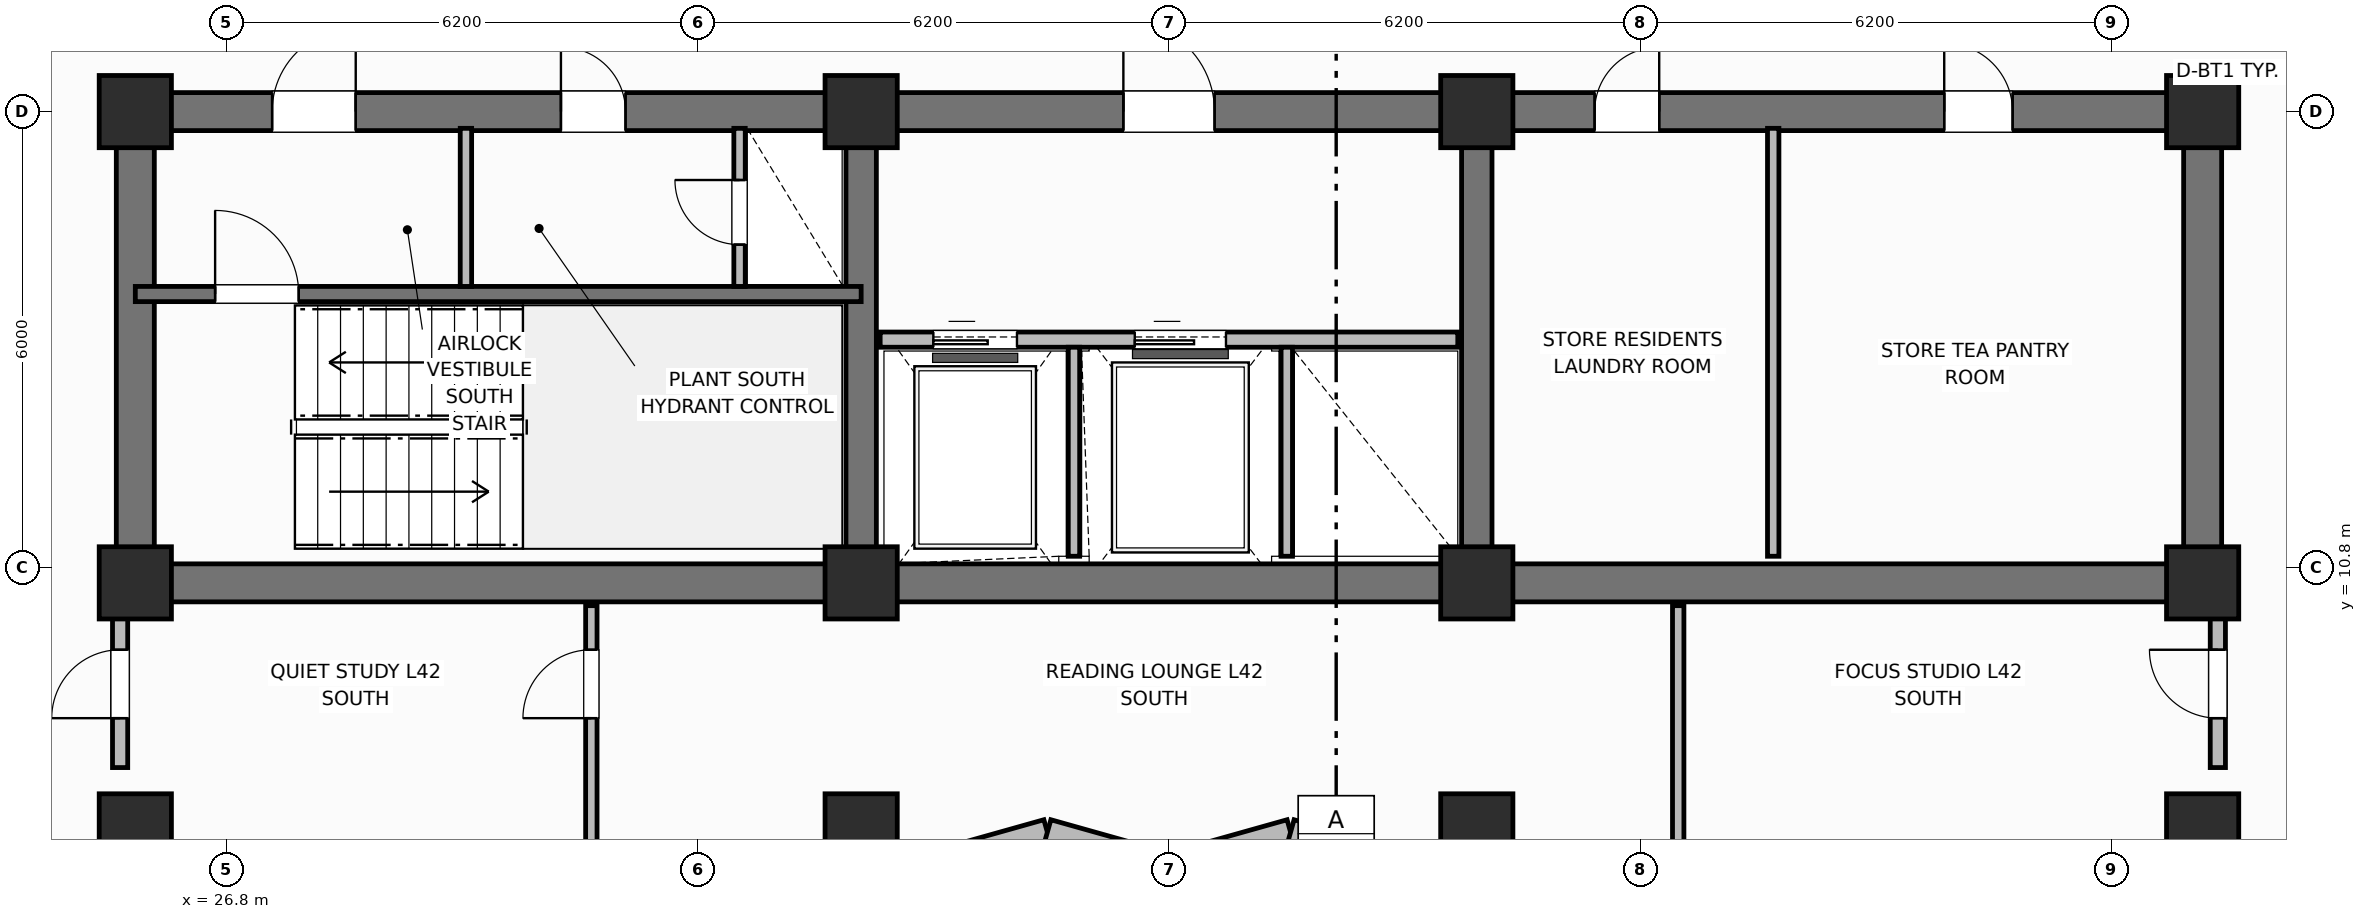
"""IFC4 building model, lengths in metres.
Left out: names, types, materials, properties, quantities, classifications, styles, units other than length and angle.
Written with IfcOpenShell. Run it as: python <this file> out.ifc"""

import sys

from ifc_helpers import new_model, si_unit, direction, frame, frame_2d, origin, origin_2d, place, context, subcontext, project, spatial, rectangle, extrude, element, fill, save


model = new_model("IFC4")
c1 = context("Model", 3, precision=1e-05, world=origin(), true_north=direction((0.0, 1.0)))
c2 = subcontext(c1, "Body", "Model", "MODEL_VIEW")
j1 = project(units=[si_unit("LENGTHUNIT", "METRE"), si_unit("PLANEANGLEUNIT", "RADIAN")], contexts=[c1])
p1 = place(None, origin())
s1 = spatial("IfcSite", under=j1, at=p1, CompositionType="ELEMENT")
p2 = place(p1, origin())
s2 = spatial("IfcBuilding", under=s1, at=p2, CompositionType="ELEMENT")
p3 = place(p2, frame((0.0, 0.0, 170.0)))
s3 = spatial("IfcBuildingStorey", under=s2, at=p3, CompositionType="ELEMENT", Elevation=170.0)
p4 = place(p3, frame((52.8, 10.6, 0.0), z_axis=(0.0, 0.0, 1.0), x_axis=(-1.0, 0.0, 0.0)))
e1 = element("IfcWall", 1, at=p4, inside=s3, PredefinedType="SHEAR", context=c2, shape_type="SweptSolid", body=[
    extrude(rectangle(XDim=27.2, YDim=0.5, at=frame_2d((13.6, 0.0))), origin(), (0.0, 0.0, 1.0), 3.7),
])
for number, where, z_axis, x_axis in (
    (2, (25.6, 10.85, 0.0), (0.0, 0.0, 1.0), (0.0, 1.0, 0.0)),
    (3, (52.8, 10.85, 0.0), (0.0, 0.0, 1.0), (0.0, 1.0, 0.0)),
):
    element("IfcWall", number, at=place(p3, frame(where, z_axis=z_axis, x_axis=x_axis)), inside=s3, PredefinedType="SHEAR", context=c2, shape_type="SweptSolid", body=[
        extrude(rectangle(XDim=5.7, YDim=0.5, at=frame_2d((2.85, 0.0))), origin(), (0.0, 0.0, 1.0), 3.7),
    ])
p5 = place(p3, frame((25.6, 16.8, 0.0), z_axis=(0.0, 0.0, 1.0), x_axis=(1.0, 0.0, 0.0)))
e4 = element("IfcWall", 4, at=p5, inside=s3, PredefinedType="SHEAR", context=c2, shape_type="SweptSolid", body=[
    extrude(rectangle(XDim=27.2, YDim=0.5, at=frame_2d((13.6, 0.0))), origin(), (0.0, 0.0, 1.0), 3.7),
])
p6 = place(p5, frame((1.8, 0.0, 0.0)))
e5 = element("IfcOpeningElement", 5, at=p6, cuts=e4, PredefinedType="OPENING", context=c2, shape_type="SweptSolid", body=[
    extrude(rectangle(XDim=1.1, YDim=2.15, at=frame_2d((0.55, 1.075))), frame((0.0, 0.26, 0.0), z_axis=(0.0, -1.0, 0.0), x_axis=(1.0, 0.0, 0.0)), (0.0, 0.0, 1.0), 0.52),
])
p7 = place(p5, frame((5.6, 0.0, 0.0)))
e6 = element("IfcOpeningElement", 6, at=p7, cuts=e4, PredefinedType="OPENING", context=c2, shape_type="SweptSolid", body=[
    extrude(rectangle(XDim=0.85, YDim=2.1, at=frame_2d((0.425, 1.05))), frame((0.0, 0.26, 0.0), z_axis=(0.0, -1.0, 0.0), x_axis=(1.0, 0.0, 0.0)), (0.0, 0.0, 1.0), 0.52),
])
p8 = place(p5, frame((13.0, 0.0, 0.0)))
e7 = element("IfcOpeningElement", 7, at=p8, cuts=e4, PredefinedType="OPENING", context=c2, shape_type="SweptSolid", body=[
    extrude(rectangle(XDim=1.2, YDim=2.15, at=frame_2d((0.6, 1.075))), frame((0.0, 0.26, 0.0), z_axis=(0.0, -1.0, 0.0), x_axis=(1.0, 0.0, 0.0)), (0.0, 0.0, 1.0), 0.52),
])
p9 = place(p5, frame((19.2, 0.0, 0.0)))
e8 = element("IfcOpeningElement", 8, at=p9, cuts=e4, PredefinedType="OPENING", context=c2, shape_type="SweptSolid", body=[
    extrude(rectangle(XDim=0.85, YDim=2.1, at=frame_2d((0.425, 1.05))), frame((0.0, 0.26, 0.0), z_axis=(0.0, -1.0, 0.0), x_axis=(1.0, 0.0, 0.0)), (0.0, 0.0, 1.0), 0.52),
])
p10 = place(p5, frame((23.8, 0.0, 0.0)))
e9 = element("IfcOpeningElement", 9, at=p10, cuts=e4, PredefinedType="OPENING", context=c2, shape_type="SweptSolid", body=[
    extrude(rectangle(XDim=0.9, YDim=2.1, at=frame_2d((0.45, 1.05))), frame((0.0, 0.26, 0.0), z_axis=(0.0, -1.0, 0.0), x_axis=(1.0, 0.0, 0.0)), (0.0, 0.0, 1.0), 0.52),
])
for number, where, z_axis, x_axis in (
    (10, (35.15, 10.85, 0.0), (0.0, 0.0, 1.0), (0.0, 1.0, 0.0)),
    (11, (43.25, 10.85, 0.0), (0.0, 0.0, 1.0), (0.0, 1.0, 0.0)),
):
    element("IfcWall", number, at=place(p3, frame(where, z_axis=z_axis, x_axis=x_axis)), inside=s3, PredefinedType="SHEAR", context=c2, shape_type="SweptSolid", body=[
        extrude(rectangle(XDim=5.7, YDim=0.4, at=frame_2d((2.85, 0.0))), origin(), (0.0, 0.0, 1.0), 3.7),
    ])
for number, where, z_axis, x_axis in (
    (12, (25.6, 10.6, 0.0), (0.0, 0.0, 1.0), (1.0, 0.0, 0.0)),
    (13, (25.6, 16.8, 0.0), (0.0, 0.0, 1.0), (1.0, 0.0, 0.0)),
    (14, (35.15, 10.6, 0.0), (0.0, 0.0, 1.0), (1.0, 0.0, 0.0)),
    (15, (35.15, 16.8, 0.0), (0.0, 0.0, 1.0), (1.0, 0.0, 0.0)),
    (16, (43.25, 10.6, 0.0), (0.0, 0.0, 1.0), (1.0, 0.0, 0.0)),
    (17, (43.25, 16.8, 0.0), (0.0, 0.0, 1.0), (1.0, 0.0, 0.0)),
    (18, (52.8, 10.6, 0.0), (0.0, 0.0, 1.0), (1.0, 0.0, 0.0)),
    (19, (52.8, 16.8, 0.0), (0.0, 0.0, 1.0), (1.0, 0.0, 0.0)),
    (20, (25.6, 7.35, 0.0), (0.0, 0.0, 1.0), (1.0, 0.0, 0.0)),
    (21, (35.15, 7.35, 0.0), (0.0, 0.0, 1.0), (1.0, 0.0, 0.0)),
    (22, (43.25, 7.35, 0.0), (0.0, 0.0, 1.0), (1.0, 0.0, 0.0)),
    (23, (52.8, 7.35, 0.0), (0.0, 0.0, 1.0), (1.0, 0.0, 0.0)),
):
    element("IfcColumn", number, at=place(p3, frame(where, z_axis=z_axis, x_axis=x_axis)), inside=s3, PredefinedType="COLUMN", context=c2, shape_type="SweptSolid", body=[
        extrude(rectangle(XDim=0.95, YDim=0.95, at=origin_2d()), origin(), (0.0, 0.0, 1.0), 3.7),
    ])
p11 = place(p3, frame((36.0, 6.87, 0.0), z_axis=(0.0, 0.0, 1.0), x_axis=(0.962662902433, 0.270703040766, 0.0)))
e24 = element("IfcWall", 24, at=p11, inside=s3, PredefinedType="SOLIDWALL", context=c2, shape_type="SweptSolid", body=[
    extrude(rectangle(XDim=1.662, YDim=0.34, at=frame_2d((0.831, 0.0))), origin(), (0.0, 0.0, 1.0), 2.72),
])
p12 = place(p3, frame((37.6, 7.32, 0.0), z_axis=(0.0, 0.0, 1.0), x_axis=(0.962652136636, -0.270741322725, 0.0)))
e25 = element("IfcWall", 25, at=p12, inside=s3, PredefinedType="SOLIDWALL", context=c2, shape_type="SweptSolid", body=[
    extrude(rectangle(XDim=1.662, YDim=0.34, at=frame_2d((0.831, 0.0))), origin(), (0.0, 0.0, 1.0), 2.72),
])
p13 = place(p3, frame((39.2, 6.87, 0.0), z_axis=(0.0, 0.0, 1.0), x_axis=(0.962662902433, 0.270703040766, 0.0)))
e26 = element("IfcWall", 26, at=p13, inside=s3, PredefinedType="SOLIDWALL", context=c2, shape_type="SweptSolid", body=[
    extrude(rectangle(XDim=1.662, YDim=0.34, at=frame_2d((0.831, 0.0))), origin(), (0.0, 0.0, 1.0), 2.72),
])
p14 = place(p3, frame((40.8, 7.32, 0.0), z_axis=(0.0, 0.0, 1.0), x_axis=(0.962652136636, -0.270741322725, 0.0)))
e27 = element("IfcWall", 27, at=p14, inside=s3, PredefinedType="SOLIDWALL", context=c2, shape_type="SweptSolid", body=[
    extrude(rectangle(XDim=1.662, YDim=0.34, at=frame_2d((0.831, 0.0))), origin(), (0.0, 0.0, 1.0), 2.72),
])
p15 = place(p3, frame((25.6, 14.4, 0.0), z_axis=(0.0, 0.0, 1.0), x_axis=(1.0, 0.0, 0.0)))
e28 = element("IfcWall", 28, at=p15, inside=s3, PredefinedType="SHEAR", context=c2, shape_type="SweptSolid", body=[
    extrude(rectangle(XDim=9.55, YDim=0.2, at=frame_2d((4.775, 0.0))), origin(), (0.0, 0.0, 1.0), 3.7),
])
p16 = place(p15, frame((1.05, 0.0, 0.0)))
e29 = element("IfcOpeningElement", 29, at=p16, cuts=e28, PredefinedType="OPENING", context=c2, shape_type="SweptSolid", body=[
    extrude(rectangle(XDim=1.1, YDim=2.15, at=frame_2d((0.55, 1.075))), frame((0.0, 0.11, 0.0), z_axis=(0.0, -1.0, 0.0), x_axis=(1.0, 0.0, 0.0)), (0.0, 0.0, 1.0), 0.22),
])
p17 = place(p3, frame((29.95, 14.5, 0.0), z_axis=(0.0, 0.0, 1.0), x_axis=(0.0, 1.0, 0.0)))
e30 = element("IfcWall", 30, at=p17, inside=s3, PredefinedType="PARTITIONING", context=c2, shape_type="SweptSolid", body=[
    extrude(rectangle(XDim=2.08, YDim=0.15, at=frame_2d((1.04, 0.0))), origin(), (0.0, 0.0, 1.0), 2.55),
])
p18 = place(p3, frame((33.55, 14.5, 0.0), z_axis=(0.0, 0.0, 1.0), x_axis=(0.0, 1.0, 0.0)))
e31 = element("IfcWall", 31, at=p18, inside=s3, PredefinedType="PARTITIONING", context=c2, shape_type="SweptSolid", body=[
    extrude(rectangle(XDim=2.08, YDim=0.15, at=frame_2d((1.04, 0.0))), origin(), (0.0, 0.0, 1.0), 2.55),
])
p19 = place(p18, frame((0.55, 0.0, 0.0)))
e32 = element("IfcOpeningElement", 32, at=p19, cuts=e31, PredefinedType="OPENING", context=c2, shape_type="SweptSolid", body=[
    extrude(rectangle(XDim=0.85, YDim=2.05, at=frame_2d((0.425, 1.025))), frame((0.0, 0.085, 0.0), z_axis=(0.0, -1.0, 0.0), x_axis=(1.0, 0.0, 0.0)), (0.0, 0.0, 1.0), 0.17),
])
p20 = place(p3, frame((35.4, 13.8, 0.0), z_axis=(0.0, 0.0, 1.0), x_axis=(1.0, 0.0, 0.0)))
e33 = element("IfcWall", 33, at=p20, inside=s3, PredefinedType="PARTITIONING", context=c2, shape_type="SweptSolid", body=[
    extrude(rectangle(XDim=7.6, YDim=0.2, at=frame_2d((3.8, 0.0))), origin(), (0.0, 0.0, 1.0), 2.32),
])
p21 = place(p20, frame((0.7, 0.0, 0.0)))
e34 = element("IfcOpeningElement", 34, at=p21, cuts=e33, PredefinedType="OPENING", context=c2, shape_type="SweptSolid", body=[
    extrude(rectangle(XDim=1.1, YDim=2.15, at=frame_2d((0.55, 1.075))), frame((0.0, 0.11, 0.0), z_axis=(0.0, -1.0, 0.0), x_axis=(1.0, 0.0, 0.0)), (0.0, 0.0, 1.0), 0.22),
])
p22 = place(p20, frame((3.35, 0.0, 0.0)))
e35 = element("IfcOpeningElement", 35, at=p22, cuts=e33, PredefinedType="OPENING", context=c2, shape_type="SweptSolid", body=[
    extrude(rectangle(XDim=1.2, YDim=2.15, at=frame_2d((0.6, 1.075))), frame((0.0, 0.11, 0.0), z_axis=(0.0, -1.0, 0.0), x_axis=(1.0, 0.0, 0.0)), (0.0, 0.0, 1.0), 0.22),
])
for number, where, z_axis, x_axis in (
    (36, (37.95, 10.95, 0.0), (0.0, 0.0, 1.0), (0.0, 1.0, 0.0)),
    (37, (40.75, 10.95, 0.0), (0.0, 0.0, 1.0), (0.0, 1.0, 0.0)),
):
    element("IfcWall", number, at=place(p3, frame(where, z_axis=z_axis, x_axis=x_axis)), inside=s3, PredefinedType="PARTITIONING", context=c2, shape_type="SweptSolid", body=[
        extrude(rectangle(XDim=2.75, YDim=0.15, at=frame_2d((1.375, 0.0))), origin(), (0.0, 0.0, 1.0), 2.55),
    ])
p23 = place(p3, frame((47.15, 10.95, 0.0), z_axis=(0.0, 0.0, 1.0), x_axis=(0.0, 1.0, 0.0)))
e38 = element("IfcWall", 38, at=p23, inside=s3, PredefinedType="PARTITIONING", context=c2, shape_type="SweptSolid", body=[
    extrude(rectangle(XDim=5.63, YDim=0.15, at=frame_2d((2.815, 0.0))), origin(), (0.0, 0.0, 1.0), 2.55),
])
p24 = place(p3, frame((31.6, 6.87, 0.0), z_axis=(0.0, 0.0, 1.0), x_axis=(0.0, 1.0, 0.0)))
e39 = element("IfcWall", 39, at=p24, inside=s3, PredefinedType="PARTITIONING", context=c2, shape_type="SweptSolid", body=[
    extrude(rectangle(XDim=3.43, YDim=0.15, at=frame_2d((1.715, 0.0))), origin(), (0.0, 0.0, 1.0), 2.55),
])
p25 = place(p24, frame((1.95, 0.0, 0.0)))
e40 = element("IfcOpeningElement", 40, at=p25, cuts=e39, PredefinedType="OPENING", context=c2, shape_type="SweptSolid", body=[
    extrude(rectangle(XDim=0.9, YDim=2.1, at=frame_2d((0.45, 1.05))), frame((0.0, 0.085, 0.0), z_axis=(0.0, -1.0, 0.0), x_axis=(1.0, 0.0, 0.0)), (0.0, 0.0, 1.0), 0.17),
])
p26 = place(p3, frame((45.9, 6.87, 0.0), z_axis=(0.0, 0.0, 1.0), x_axis=(0.0, 1.0, 0.0)))
e41 = element("IfcWall", 41, at=p26, inside=s3, PredefinedType="PARTITIONING", context=c2, shape_type="SweptSolid", body=[
    extrude(rectangle(XDim=3.43, YDim=0.15, at=frame_2d((1.715, 0.0))), origin(), (0.0, 0.0, 1.0), 2.55),
])
p27 = place(p3, frame((25.4, 8.17, 0.0), z_axis=(0.0, 0.0, 1.0), x_axis=(0.0, 1.0, 0.0)))
e42 = element("IfcWall", 42, at=p27, inside=s3, PredefinedType="PARTITIONING", context=c2, shape_type="SweptSolid", body=[
    extrude(rectangle(XDim=2.13, YDim=0.2, at=frame_2d((1.065, 0.0))), origin(), (0.0, 0.0, 1.0), 2.55),
])
p28 = place(p27, frame((0.65, 0.0, 0.0)))
e43 = element("IfcOpeningElement", 43, at=p28, cuts=e42, PredefinedType="OPENING", context=c2, shape_type="SweptSolid", body=[
    extrude(rectangle(XDim=0.9, YDim=2.1, at=frame_2d((0.45, 1.05))), frame((0.0, 0.11, 0.0), z_axis=(0.0, -1.0, 0.0), x_axis=(1.0, 0.0, 0.0)), (0.0, 0.0, 1.0), 0.22),
])
p29 = place(p3, frame((53.0, 8.17, 0.0), z_axis=(0.0, 0.0, 1.0), x_axis=(0.0, 1.0, 0.0)))
e44 = element("IfcWall", 44, at=p29, inside=s3, PredefinedType="PARTITIONING", context=c2, shape_type="SweptSolid", body=[
    extrude(rectangle(XDim=2.13, YDim=0.2, at=frame_2d((1.065, 0.0))), origin(), (0.0, 0.0, 1.0), 2.55),
])
p30 = place(p29, frame((0.65, 0.0, 0.0)))
e45 = element("IfcOpeningElement", 45, at=p30, cuts=e44, PredefinedType="OPENING", context=c2, shape_type="SweptSolid", body=[
    extrude(rectangle(XDim=0.9, YDim=2.1, at=frame_2d((0.45, 1.05))), frame((0.0, 0.11, 0.0), z_axis=(0.0, -1.0, 0.0), x_axis=(1.0, 0.0, 0.0)), (0.0, 0.0, 1.0), 0.22),
])
p31 = place(p16, origin())
e46 = element("IfcDoor", 46, at=p31, inside=s3, OperationType="SINGLE_SWING_LEFT", PredefinedType="DOOR", context=c2, shape_type="SweptSolid", body=[
    extrude(rectangle(XDim=1.1, YDim=2.15, at=frame_2d((0.55, 1.075))), frame((0.0, 0.025, 0.0), z_axis=(0.0, -1.0, 0.0), x_axis=(1.0, 0.0, 0.0)), (0.0, 0.0, 1.0), 0.05),
])
fill(e29, e46)
p32 = place(p19, origin())
e47 = element("IfcDoor", 47, at=p32, inside=s3, OperationType="SINGLE_SWING_RIGHT", PredefinedType="TRAPDOOR", context=c2, shape_type="SweptSolid", body=[
    extrude(rectangle(XDim=0.85, YDim=2.05, at=frame_2d((0.425, 1.025))), frame((0.0, 0.025, 0.0), z_axis=(0.0, -1.0, 0.0), x_axis=(1.0, 0.0, 0.0)), (0.0, 0.0, 1.0), 0.05),
])
fill(e32, e47)
p33 = place(p21, origin())
e48 = element("IfcDoor", 48, at=p33, inside=s3, OperationType="SLIDING_TO_LEFT", PredefinedType="DOOR", context=c2, shape_type="SweptSolid", body=[
    extrude(rectangle(XDim=1.1, YDim=2.15, at=frame_2d((0.55, 1.075))), frame((0.0, 0.025, 0.0), z_axis=(0.0, -1.0, 0.0), x_axis=(1.0, 0.0, 0.0)), (0.0, 0.0, 1.0), 0.05),
])
fill(e34, e48)
p34 = place(p22, origin())
e49 = element("IfcDoor", 49, at=p34, inside=s3, OperationType="SLIDING_TO_LEFT", PredefinedType="DOOR", context=c2, shape_type="SweptSolid", body=[
    extrude(rectangle(XDim=1.2, YDim=2.15, at=frame_2d((0.6, 1.075))), frame((0.0, 0.025, 0.0), z_axis=(0.0, -1.0, 0.0), x_axis=(1.0, 0.0, 0.0)), (0.0, 0.0, 1.0), 0.05),
])
fill(e35, e49)
p35 = place(p25, origin())
e50 = element("IfcDoor", 50, at=p35, inside=s3, OperationType="SINGLE_SWING_LEFT", PredefinedType="DOOR", context=c2, shape_type="SweptSolid", body=[
    extrude(rectangle(XDim=0.9, YDim=2.1, at=frame_2d((0.45, 1.05))), frame((0.0, 0.025, 0.0), z_axis=(0.0, -1.0, 0.0), x_axis=(1.0, 0.0, 0.0)), (0.0, 0.0, 1.0), 0.05),
])
fill(e40, e50)
p36 = place(p28, origin())
e51 = element("IfcDoor", 51, at=p36, inside=s3, OperationType="SINGLE_SWING_LEFT", PredefinedType="DOOR", context=c2, shape_type="SweptSolid", body=[
    extrude(rectangle(XDim=0.9, YDim=2.1, at=frame_2d((0.45, 1.05))), frame((0.0, 0.025, 0.0), z_axis=(0.0, -1.0, 0.0), x_axis=(1.0, 0.0, 0.0)), (0.0, 0.0, 1.0), 0.05),
])
fill(e43, e51)
p37 = place(p30, origin())
e52 = element("IfcDoor", 52, at=p37, inside=s3, OperationType="SINGLE_SWING_RIGHT", PredefinedType="DOOR", context=c2, shape_type="SweptSolid", body=[
    extrude(rectangle(XDim=0.9, YDim=2.1, at=frame_2d((0.45, 1.05))), frame((0.0, 0.025, 0.0), z_axis=(0.0, -1.0, 0.0), x_axis=(1.0, 0.0, 0.0)), (0.0, 0.0, 1.0), 0.05),
])
fill(e45, e52)
p38 = place(p6, origin())
e53 = element("IfcDoor", 53, at=p38, inside=s3, OperationType="SINGLE_SWING_RIGHT", PredefinedType="DOOR", context=c2, shape_type="SweptSolid", body=[
    extrude(rectangle(XDim=1.1, YDim=2.15, at=frame_2d((0.55, 1.075))), frame((0.0, 0.025, 0.0), z_axis=(0.0, -1.0, 0.0), x_axis=(1.0, 0.0, 0.0)), (0.0, 0.0, 1.0), 0.05),
])
fill(e5, e53)
p39 = place(p7, origin())
e54 = element("IfcDoor", 54, at=p39, inside=s3, OperationType="SINGLE_SWING_LEFT", PredefinedType="DOOR", context=c2, shape_type="SweptSolid", body=[
    extrude(rectangle(XDim=0.85, YDim=2.1, at=frame_2d((0.425, 1.05))), frame((0.0, 0.025, 0.0), z_axis=(0.0, -1.0, 0.0), x_axis=(1.0, 0.0, 0.0)), (0.0, 0.0, 1.0), 0.05),
])
fill(e6, e54)
p40 = place(p8, origin())
e55 = element("IfcDoor", 55, at=p40, inside=s3, OperationType="SINGLE_SWING_LEFT", PredefinedType="DOOR", context=c2, shape_type="SweptSolid", body=[
    extrude(rectangle(XDim=1.2, YDim=2.15, at=frame_2d((0.6, 1.075))), frame((0.0, 0.025, 0.0), z_axis=(0.0, -1.0, 0.0), x_axis=(1.0, 0.0, 0.0)), (0.0, 0.0, 1.0), 0.05),
])
fill(e7, e55)
p41 = place(p9, origin())
e56 = element("IfcDoor", 56, at=p41, inside=s3, OperationType="SINGLE_SWING_RIGHT", PredefinedType="DOOR", context=c2, shape_type="SweptSolid", body=[
    extrude(rectangle(XDim=0.85, YDim=2.1, at=frame_2d((0.425, 1.05))), frame((0.0, 0.025, 0.0), z_axis=(0.0, -1.0, 0.0), x_axis=(1.0, 0.0, 0.0)), (0.0, 0.0, 1.0), 0.05),
])
fill(e8, e56)
p42 = place(p10, origin())
e57 = element("IfcDoor", 57, at=p42, inside=s3, OperationType="SINGLE_SWING_LEFT", PredefinedType="DOOR", context=c2, shape_type="SweptSolid", body=[
    extrude(rectangle(XDim=0.9, YDim=2.1, at=frame_2d((0.45, 1.05))), frame((0.0, 0.025, 0.0), z_axis=(0.0, -1.0, 0.0), x_axis=(1.0, 0.0, 0.0)), (0.0, 0.0, 1.0), 0.05),
])
fill(e9, e57)
save(model, sys.argv[1])
